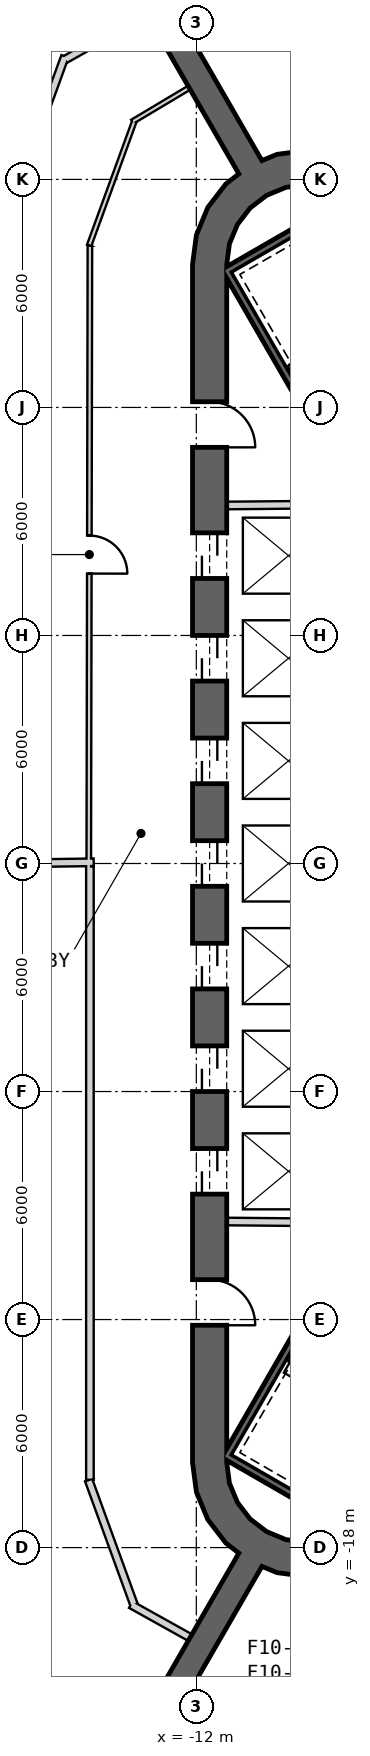
"""IFC4 building model, lengths in metres.
Left out: names, types, materials, properties, quantities, classifications, styles, units other than length and angle.
Written with IfcOpenShell. Run it as: python <this file> out.ifc"""

import sys

from ifc_helpers import new_model, si_unit, direction, frame, frame_2d, origin, place, context, subcontext, project, spatial, polyline, rectangle, outline, extrude, element, fill, save


model = new_model("IFC4")
c1 = context("Model", 3, precision=1e-05, world=origin(), true_north=direction((0.0, 1.0)))
c2 = subcontext(c1, "Body", "Model", "MODEL_VIEW")
j1 = project(units=[si_unit("LENGTHUNIT", "METRE"), si_unit("PLANEANGLEUNIT", "RADIAN")], contexts=[c1])
p1 = place(None, origin())
s1 = spatial("IfcSite", under=j1, at=p1, CompositionType="ELEMENT")
p2 = place(p1, origin())
s2 = spatial("IfcBuilding", under=s1, at=p2, CompositionType="ELEMENT")
p3 = place(p2, frame((0.0, 0.0, 181.2)))
s3 = spatial("IfcBuildingStorey", under=s2, at=p3, CompositionType="ELEMENT", Elevation=181.2)
p4 = place(p3, frame((-11.65, 15.762, 0.0), z_axis=(0.0, 0.0, 1.0), x_axis=(0.0, -1.0, 0.0)))
e1 = element("IfcWall", 1, at=p4, inside=s3, PredefinedType="SHEAR", context=c2, shape_type="SweptSolid", body=[
    extrude(rectangle(XDim=31.523, YDim=0.9, at=frame_2d((15.762, 0.0))), origin(), (0.0, 0.0, 1.0), 4.0),
])
p5 = place(p4, frame((7.062, 0.0, 0.0)))
e2 = element("IfcOpeningElement", 2, at=p5, cuts=e1, PredefinedType="OPENING", context=c2, shape_type="SweptSolid", body=[
    extrude(rectangle(XDim=1.2, YDim=2.4, at=frame_2d((0.6, 1.2))), frame((0.0, 0.46, 0.0), z_axis=(0.0, -1.0, 0.0), x_axis=(1.0, 0.0, 0.0)), (0.0, 0.0, 1.0), 0.92),
])
p6 = place(p4, frame((9.762, 0.0, 0.0)))
e3 = element("IfcOpeningElement", 3, at=p6, cuts=e1, PredefinedType="OPENING", context=c2, shape_type="SweptSolid", body=[
    extrude(rectangle(XDim=1.2, YDim=2.4, at=frame_2d((0.6, 1.2))), frame((0.0, 0.46, 0.0), z_axis=(0.0, -1.0, 0.0), x_axis=(1.0, 0.0, 0.0)), (0.0, 0.0, 1.0), 0.92),
])
p7 = place(p4, frame((12.462, 0.0, 0.0)))
e4 = element("IfcOpeningElement", 4, at=p7, cuts=e1, PredefinedType="OPENING", context=c2, shape_type="SweptSolid", body=[
    extrude(rectangle(XDim=1.2, YDim=2.4, at=frame_2d((0.6, 1.2))), frame((0.0, 0.46, 0.0), z_axis=(0.0, -1.0, 0.0), x_axis=(1.0, 0.0, 0.0)), (0.0, 0.0, 1.0), 0.92),
])
p8 = place(p4, frame((15.162, 0.0, 0.0)))
e5 = element("IfcOpeningElement", 5, at=p8, cuts=e1, PredefinedType="OPENING", context=c2, shape_type="SweptSolid", body=[
    extrude(rectangle(XDim=1.2, YDim=2.4, at=frame_2d((0.6, 1.2))), frame((0.0, 0.46, 0.0), z_axis=(0.0, -1.0, 0.0), x_axis=(1.0, 0.0, 0.0)), (0.0, 0.0, 1.0), 0.92),
])
p9 = place(p4, frame((17.862, 0.0, 0.0)))
e6 = element("IfcOpeningElement", 6, at=p9, cuts=e1, PredefinedType="OPENING", context=c2, shape_type="SweptSolid", body=[
    extrude(rectangle(XDim=1.2, YDim=2.4, at=frame_2d((0.6, 1.2))), frame((0.0, 0.46, 0.0), z_axis=(0.0, -1.0, 0.0), x_axis=(1.0, 0.0, 0.0)), (0.0, 0.0, 1.0), 0.92),
])
p10 = place(p4, frame((20.562, 0.0, 0.0)))
e7 = element("IfcOpeningElement", 7, at=p10, cuts=e1, PredefinedType="OPENING", context=c2, shape_type="SweptSolid", body=[
    extrude(rectangle(XDim=1.2, YDim=2.4, at=frame_2d((0.6, 1.2))), frame((0.0, 0.46, 0.0), z_axis=(0.0, -1.0, 0.0), x_axis=(1.0, 0.0, 0.0)), (0.0, 0.0, 1.0), 0.92),
])
p11 = place(p4, frame((23.262, 0.0, 0.0)))
e8 = element("IfcOpeningElement", 8, at=p11, cuts=e1, PredefinedType="OPENING", context=c2, shape_type="SweptSolid", body=[
    extrude(rectangle(XDim=1.2, YDim=2.4, at=frame_2d((0.6, 1.2))), frame((0.0, 0.46, 0.0), z_axis=(0.0, -1.0, 0.0), x_axis=(1.0, 0.0, 0.0)), (0.0, 0.0, 1.0), 0.92),
])
p12 = place(p4, frame((3.612, 0.0, 0.0)))
e9 = element("IfcOpeningElement", 9, at=p12, cuts=e1, PredefinedType="OPENING", context=c2, shape_type="SweptSolid", body=[
    extrude(rectangle(XDim=1.2, YDim=2.4, at=frame_2d((0.6, 1.2))), frame((0.0, 0.46, 0.0), z_axis=(0.0, -1.0, 0.0), x_axis=(1.0, 0.0, 0.0)), (0.0, 0.0, 1.0), 0.92),
])
p13 = place(p4, frame((26.712, 0.0, 0.0)))
e10 = element("IfcOpeningElement", 10, at=p13, cuts=e1, PredefinedType="OPENING", context=c2, shape_type="SweptSolid", body=[
    extrude(rectangle(XDim=1.2, YDim=2.4, at=frame_2d((0.6, 1.2))), frame((0.0, 0.46, 0.0), z_axis=(0.0, -1.0, 0.0), x_axis=(1.0, 0.0, 0.0)), (0.0, 0.0, 1.0), 0.92),
])
p14 = place(p3, origin())
e11 = element("IfcWall", 11, at=p14, inside=s3, PredefinedType="SHEAR", context=c2, shape_type="SweptSolid", body=[
    extrude(outline(polyline([(-7.6, 18.36), (-8.323, 18.659), (-9.1, 18.762), (-9.876, 18.659), (-10.6, 18.36), (-11.221, 17.883), (-11.698, 17.262), (-11.998, 16.538), (-12.1, 15.762), (-11.2, 15.762), (-11.128, 16.305), (-10.919, 16.812), (-10.585, 17.247), (-10.15, 17.58), (-9.644, 17.79), (-9.1, 17.862), (-8.556, 17.79), (-8.05, 17.58), (-7.6, 18.36)])), origin(), (0.0, 0.0, 1.0), 4.0),
])
p15 = place(p3, origin())
e12 = element("IfcWall", 12, at=p15, inside=s3, PredefinedType="SHEAR", context=c2, shape_type="SweptSolid", body=[
    extrude(outline(polyline([(-12.1, -15.762), (-11.998, -16.538), (-11.698, -17.262), (-11.221, -17.883), (-10.6, -18.36), (-9.876, -18.659), (-9.1, -18.762), (-8.323, -18.659), (-7.6, -18.36), (-8.05, -17.58), (-8.556, -17.79), (-9.1, -17.862), (-9.644, -17.79), (-10.15, -17.58), (-10.585, -17.247), (-10.919, -16.812), (-11.128, -16.305), (-11.2, -15.762), (-12.1, -15.762)])), origin(), (0.0, 0.0, 1.0), 4.0),
])
for number, where, z_axis, x_axis in (
    (13, (-10.575, 18.316, 0.0), (0.0, 0.0, 1.0), (-0.5, 0.866, 0.0)),
    (14, (-10.575, -18.316, 0.0), (0.0, 0.0, 1.0), (-0.5, -0.866, 0.0)),
):
    element("IfcWall", number, at=place(p3, frame(where, z_axis=z_axis, x_axis=x_axis)), inside=s3, PredefinedType="SHEAR", context=c2, shape_type="SweptSolid", body=[
        extrude(rectangle(XDim=12.22, YDim=0.7, at=frame_2d((6.11, 0.0))), origin(), (0.0, 0.0, 1.0), 4.0),
    ])
p16 = place(p3, frame((-11.2, 9.42, 0.0), z_axis=(0.0, 0.0, 1.0), x_axis=(0.999957167047, 0.009255488683, 0.0)))
e15 = element("IfcWall", 15, at=p16, inside=s3, PredefinedType="PLUMBINGWALL", context=c2, shape_type="SweptSolid", body=[
    extrude(rectangle(XDim=3.35, YDim=0.2, at=frame_2d((1.675, 0.0))), origin(), (0.0, 0.0, 1.0), 3.7),
])
p17 = place(p3, frame((-8.05, -9.449, 0.0), z_axis=(0.0, 0.0, 1.0), x_axis=(-0.999957467379, 0.009222983926, 0.0)))
e16 = element("IfcWall", 16, at=p17, inside=s3, PredefinedType="PLUMBINGWALL", context=c2, shape_type="SweptSolid", body=[
    extrude(rectangle(XDim=3.15, YDim=0.2, at=frame_2d((1.575, 0.0))), origin(), (0.0, 0.0, 1.0), 3.7),
])
p18 = place(p3, frame((-11.245, 15.678, -0.3), z_axis=(0.0, 0.0, 1.0), x_axis=(0.499977274689, -0.866038523851, 0.0)))
e17 = element("IfcWall", 17, at=p18, inside=s3, PredefinedType="SHEAR", context=c2, shape_type="SweptSolid", body=[
    extrude(rectangle(XDim=8.1, YDim=0.2, at=frame_2d((4.05, 0.0))), origin(), (0.0, 0.0, 1.0), 4.0),
])
for number, where, z_axis, x_axis in (
    (18, (-7.818, 17.541, -0.3), (0.0, 0.0, 1.0), (-0.866, -0.5, 0.0)),
    (19, (-11.282, -15.541, -0.3), (0.0, 0.0, 1.0), (0.866, -0.5, 0.0)),
):
    element("IfcWall", number, at=place(p3, frame(where, z_axis=z_axis, x_axis=x_axis)), inside=s3, PredefinedType="SHEAR", context=c2, shape_type="SweptSolid", body=[
        extrude(rectangle(XDim=3.8, YDim=0.2, at=frame_2d((1.9, 0.0))), origin(), (0.0, 0.0, 1.0), 4.0),
    ])
p19 = place(p3, frame((-7.196, -8.663, -0.3), z_axis=(0.0, 0.0, 1.0), x_axis=(-0.499997992926, -0.866026562566, 0.0)))
e20 = element("IfcWall", 20, at=p19, inside=s3, PredefinedType="SHEAR", context=c2, shape_type="SweptSolid", body=[
    extrude(rectangle(XDim=7.9, YDim=0.2, at=frame_2d((3.95, 0.0))), origin(), (0.0, 0.0, 1.0), 4.0),
])
p20 = place(p3, frame((-12.189, 20.411, 0.0), z_axis=(0.0, 0.0, 1.0), x_axis=(-0.858492721014, -0.51282574815, 0.0)))
e21 = element("IfcWall", 21, at=p20, inside=s3, PredefinedType="PARTITIONING", context=c2, shape_type="SweptSolid", body=[
    extrude(rectangle(XDim=1.742, YDim=0.12, at=frame_2d((0.871, 0.0))), origin(), (0.0, 0.0, 1.0), 3.7),
])
p21 = place(p3, frame((-13.631, 19.53, 0.0), z_axis=(0.0, 0.0, 1.0), x_axis=(-0.342069878069, -0.939674517329, 0.0)))
e22 = element("IfcWall", 22, at=p21, inside=s3, PredefinedType="PARTITIONING", context=c2, shape_type="SweptSolid", body=[
    extrude(rectangle(XDim=3.479, YDim=0.12, at=frame_2d((1.739, 0.0))), origin(), (0.0, 0.0, 1.0), 2.78),
])
p22 = place(p3, frame((-14.8, 16.257, 0.0), z_axis=(0.0, 0.0, 1.0), x_axis=(-0.001847148781, -0.999998294019, 0.0)))
e23 = element("IfcWall", 23, at=p22, inside=s3, PredefinedType="PARTITIONING", context=c2, shape_type="SweptSolid", body=[
    extrude(rectangle(XDim=16.257, YDim=0.12, at=frame_2d((8.128, 0.0))), origin(), (0.0, 0.0, 1.0), 2.88),
])
p23 = place(p22, frame((7.629, 0.0, 0.0)))
e24 = element("IfcOpeningElement", 24, at=p23, cuts=e23, PredefinedType="OPENING", context=c2, shape_type="SweptSolid", body=[
    extrude(rectangle(XDim=1.0, YDim=2.1, at=frame_2d((0.5, 1.05))), frame((0.0, 0.07, 0.0), z_axis=(0.0, -1.0, 0.0), x_axis=(1.0, 0.0, 0.0)), (0.0, 0.0, 1.0), 0.14),
])
p24 = place(p3, frame((-17.2, -0.001, 0.0), z_axis=(0.0, 0.0, 1.0), x_axis=(0.999915662945, 0.012987185857, 0.0)))
e25 = element("IfcWall", 25, at=p24, inside=s3, PredefinedType="PARTITIONING", context=c2, shape_type="SweptSolid", body=[
    extrude(rectangle(XDim=2.5, YDim=0.2, at=frame_2d((1.25, 0.0))), origin(), (0.0, 0.0, 1.0), 3.07),
])
p25 = place(p3, frame((-15.456, 21.239, 0.0), z_axis=(0.0, 0.0, 1.0), x_axis=(-0.34205546997, -0.939679762187, 0.0)))
e26 = element("IfcWall", 26, at=p25, inside=s3, PredefinedType="PARTITIONING", context=c2, shape_type="SweptSolid", body=[
    extrude(rectangle(XDim=4.706, YDim=0.2, at=frame_2d((2.353, 0.0))), origin(), (0.0, 0.0, 1.0), 2.78),
])
p26 = place(p3, frame((-13.313, 22.359, 0.0), z_axis=(0.0, 0.0, 1.0), x_axis=(-0.87121710687, -0.490897904555, 0.0)))
e27 = element("IfcWall", 27, at=p26, inside=s3, PredefinedType="PARTITIONING", context=c2, shape_type="SweptSolid", body=[
    extrude(rectangle(XDim=2.457, YDim=0.2, at=frame_2d((1.229, 0.0))), origin(), (0.0, 0.0, 1.0), 3.7),
])
p27 = place(p3, frame((-13.722, -19.499, 0.0), z_axis=(0.0, 0.0, 1.0), x_axis=(0.873381780332, -0.487036205824, 0.0)))
e28 = element("IfcWall", 28, at=p27, inside=s3, PredefinedType="PARTITIONING", context=c2, shape_type="SweptSolid", body=[
    extrude(rectangle(XDim=1.785, YDim=0.2, at=frame_2d((0.892, 0.0))), origin(), (0.0, 0.0, 1.0), 3.7),
])
p28 = place(p3, frame((-14.834, -16.223, 0.0), z_axis=(0.0, 0.0, 1.0), x_axis=(0.342017717312, -0.939693503779, 0.0)))
e29 = element("IfcWall", 29, at=p28, inside=s3, PredefinedType="PARTITIONING", context=c2, shape_type="SweptSolid", body=[
    extrude(rectangle(XDim=3.497, YDim=0.2, at=frame_2d((1.749, 0.0))), origin(), (0.0, 0.0, 1.0), 2.78),
])
p29 = place(p3, frame((-14.8, -0.07, 0.0), z_axis=(0.0, 0.0, 1.0), x_axis=(0.0, -1.0, 0.0)))
e30 = element("IfcWall", 30, at=p29, inside=s3, PredefinedType="PARTITIONING", context=c2, shape_type="SweptSolid", body=[
    extrude(rectangle(XDim=16.147, YDim=0.2, at=frame_2d((8.073, 0.0))), origin(), (0.0, 0.0, 1.0), 2.88),
])
p30 = place(p23, origin())
e31 = element("IfcDoor", 31, at=p30, inside=s3, OperationType="SINGLE_SWING_LEFT", PredefinedType="NOTDEFINED", context=c2, shape_type="SweptSolid", body=[
    extrude(rectangle(XDim=1.0, YDim=2.1, at=frame_2d((0.5, 1.05))), frame((0.0, 0.025, 0.0), z_axis=(0.0, -1.0, 0.0), x_axis=(1.0, 0.0, 0.0)), (0.0, 0.0, 1.0), 0.05),
])
fill(e24, e31)
p31 = place(p5, origin())
e32 = element("IfcDoor", 32, at=p31, inside=s3, OperationType="SLIDING_TO_LEFT", PredefinedType="USERDEFINED", context=c2, shape_type="SweptSolid", body=[
    extrude(rectangle(XDim=1.2, YDim=2.4, at=frame_2d((0.6, 1.2))), frame((0.0, 0.025, 0.0), z_axis=(0.0, -1.0, 0.0), x_axis=(1.0, 0.0, 0.0)), (0.0, 0.0, 1.0), 0.05),
])
fill(e2, e32)
p32 = place(p6, origin())
e33 = element("IfcDoor", 33, at=p32, inside=s3, OperationType="SLIDING_TO_LEFT", PredefinedType="USERDEFINED", context=c2, shape_type="SweptSolid", body=[
    extrude(rectangle(XDim=1.2, YDim=2.4, at=frame_2d((0.6, 1.2))), frame((0.0, 0.025, 0.0), z_axis=(0.0, -1.0, 0.0), x_axis=(1.0, 0.0, 0.0)), (0.0, 0.0, 1.0), 0.05),
])
fill(e3, e33)
p33 = place(p7, origin())
e34 = element("IfcDoor", 34, at=p33, inside=s3, OperationType="SLIDING_TO_LEFT", PredefinedType="USERDEFINED", context=c2, shape_type="SweptSolid", body=[
    extrude(rectangle(XDim=1.2, YDim=2.4, at=frame_2d((0.6, 1.2))), frame((0.0, 0.025, 0.0), z_axis=(0.0, -1.0, 0.0), x_axis=(1.0, 0.0, 0.0)), (0.0, 0.0, 1.0), 0.05),
])
fill(e4, e34)
p34 = place(p8, origin())
e35 = element("IfcDoor", 35, at=p34, inside=s3, OperationType="SLIDING_TO_LEFT", PredefinedType="USERDEFINED", context=c2, shape_type="SweptSolid", body=[
    extrude(rectangle(XDim=1.2, YDim=2.4, at=frame_2d((0.6, 1.2))), frame((0.0, 0.025, 0.0), z_axis=(0.0, -1.0, 0.0), x_axis=(1.0, 0.0, 0.0)), (0.0, 0.0, 1.0), 0.05),
])
fill(e5, e35)
p35 = place(p9, origin())
e36 = element("IfcDoor", 36, at=p35, inside=s3, OperationType="SLIDING_TO_LEFT", PredefinedType="USERDEFINED", context=c2, shape_type="SweptSolid", body=[
    extrude(rectangle(XDim=1.2, YDim=2.4, at=frame_2d((0.6, 1.2))), frame((0.0, 0.025, 0.0), z_axis=(0.0, -1.0, 0.0), x_axis=(1.0, 0.0, 0.0)), (0.0, 0.0, 1.0), 0.05),
])
fill(e6, e36)
p36 = place(p10, origin())
e37 = element("IfcDoor", 37, at=p36, inside=s3, OperationType="SLIDING_TO_LEFT", PredefinedType="USERDEFINED", context=c2, shape_type="SweptSolid", body=[
    extrude(rectangle(XDim=1.2, YDim=2.4, at=frame_2d((0.6, 1.2))), frame((0.0, 0.025, 0.0), z_axis=(0.0, -1.0, 0.0), x_axis=(1.0, 0.0, 0.0)), (0.0, 0.0, 1.0), 0.05),
])
fill(e7, e37)
p37 = place(p11, origin())
e38 = element("IfcDoor", 38, at=p37, inside=s3, OperationType="SLIDING_TO_LEFT", PredefinedType="USERDEFINED", context=c2, shape_type="SweptSolid", body=[
    extrude(rectangle(XDim=1.2, YDim=2.4, at=frame_2d((0.6, 1.2))), frame((0.0, 0.025, 0.0), z_axis=(0.0, -1.0, 0.0), x_axis=(1.0, 0.0, 0.0)), (0.0, 0.0, 1.0), 0.05),
])
fill(e8, e38)
p38 = place(p12, origin())
e39 = element("IfcDoor", 39, at=p38, inside=s3, OperationType="SINGLE_SWING_RIGHT", PredefinedType="USERDEFINED", context=c2, shape_type="SweptSolid", body=[
    extrude(rectangle(XDim=1.2, YDim=2.4, at=frame_2d((0.6, 1.2))), frame((0.0, 0.025, 0.0), z_axis=(0.0, -1.0, 0.0), x_axis=(1.0, 0.0, 0.0)), (0.0, 0.0, 1.0), 0.05),
])
fill(e9, e39)
p39 = place(p13, origin())
e40 = element("IfcDoor", 40, at=p39, inside=s3, OperationType="SINGLE_SWING_LEFT", PredefinedType="USERDEFINED", context=c2, shape_type="SweptSolid", body=[
    extrude(rectangle(XDim=1.2, YDim=2.4, at=frame_2d((0.6, 1.2))), frame((0.0, 0.025, 0.0), z_axis=(0.0, -1.0, 0.0), x_axis=(1.0, 0.0, 0.0)), (0.0, 0.0, 1.0), 0.05),
])
fill(e10, e40)
save(model, sys.argv[1])
